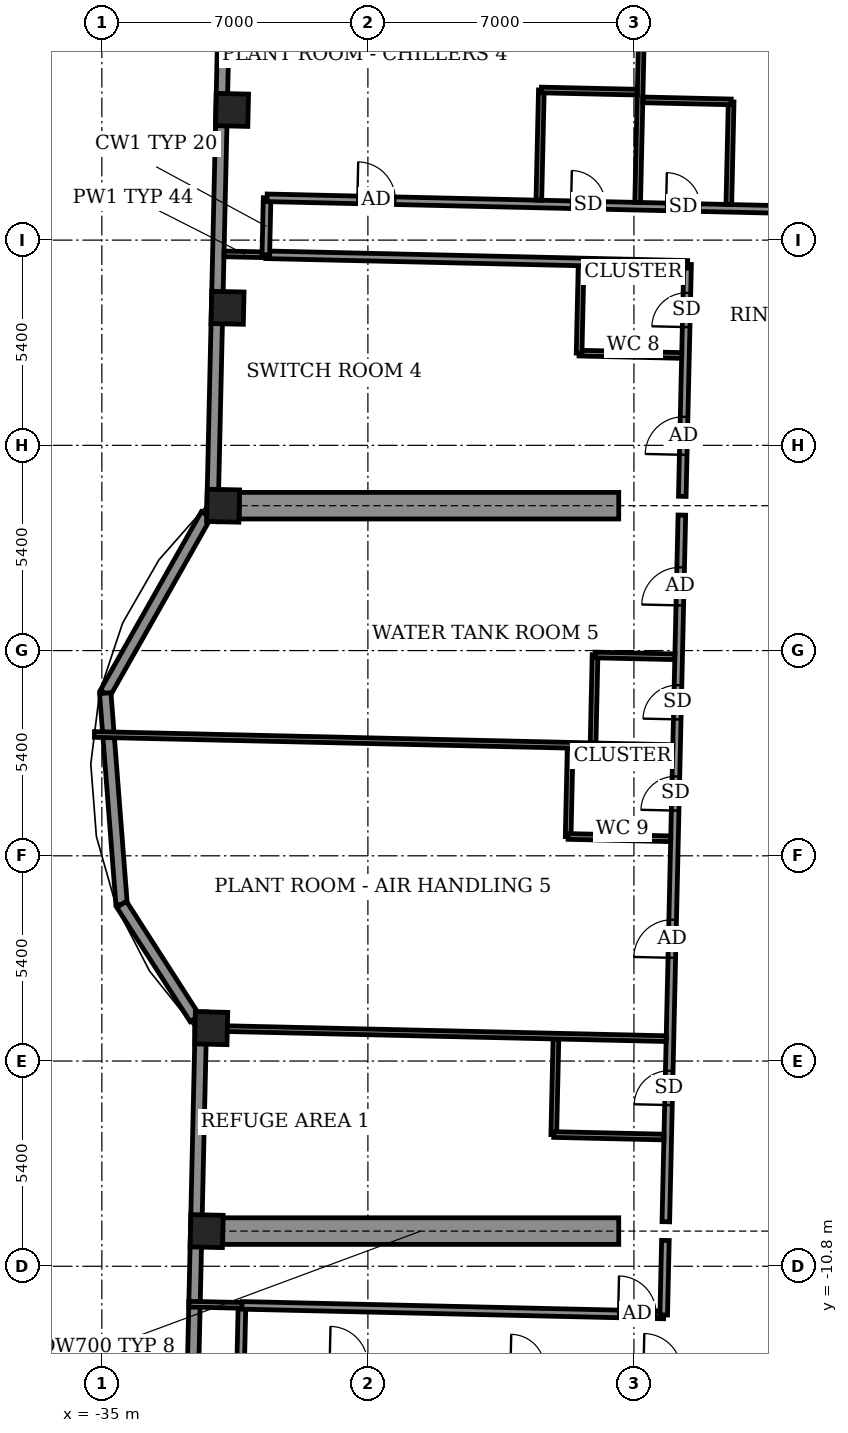
"""IFC4 building model, lengths in metres.
Left out: names, types, materials, properties, quantities, classifications, styles, units other than length and angle.
Written with IfcOpenShell. Run it as: python <this file> out.ifc"""

import sys

from ifc_helpers import new_model, si_unit, direction, frame, frame_2d, origin, origin_2d, place, context, subcontext, project, spatial, rectangle, extrude, element, fill, save


model = new_model("IFC4")
c1 = context("Model", 3, precision=1e-05, world=origin(), true_north=direction((0.0, 1.0)))
c2 = subcontext(c1, "Body", "Model", "MODEL_VIEW")
j1 = project(units=[si_unit("LENGTHUNIT", "METRE"), si_unit("PLANEANGLEUNIT", "RADIAN")], contexts=[c1])
p1 = place(None, origin())
s1 = spatial("IfcSite", under=j1, at=p1, CompositionType="ELEMENT")
p2 = place(p1, origin())
s2 = spatial("IfcBuilding", under=s1, at=p2, CompositionType="ELEMENT")
p3 = place(p2, frame((0.0, 0.0, 324.1)))
s3 = spatial("IfcBuildingStorey", under=s2, at=p3, CompositionType="ELEMENT", Elevation=324.1)
for number, where, z_axis, x_axis in (
    (1, (-32.123, -4.535, -0.55), (0.0, 0.0, 1.0), (-0.023, -1.0, 0.0)),
    (2, (-32.244, -9.875, -0.55), (0.0, 0.0, 1.0), (-0.023, -1.0, 0.0)),
    (3, (-31.575, 19.626, -0.55), (0.0, 0.0, 1.0), (-0.023, -1.0, 0.0)),
    (4, (-31.693, 14.419, -0.55), (0.0, 0.0, 1.0), (-0.023, -1.0, 0.0)),
    (5, (-31.811, 9.212, -0.55), (0.0, 0.0, 1.0), (-0.023, -1.0, 0.0)),
):
    element("IfcColumn", number, at=place(p3, frame(where, z_axis=z_axis, x_axis=x_axis)), inside=s3, PredefinedType="COLUMN", context=c2, shape_type="SweptSolid", body=[
        extrude(rectangle(XDim=0.85, YDim=0.85, at=origin_2d()), origin(), (0.0, 0.0, 1.0), 5.6),
    ])
p4 = place(p3, frame((-21.4, 9.212, 0.0), z_axis=(0.0, 0.0, 1.0), x_axis=(-1.0, 0.0, 0.0)))
e6 = element("IfcWall", 6, at=p4, inside=s3, PredefinedType="SHEAR", context=c2, shape_type="SweptSolid", body=[
    extrude(rectangle(XDim=9.986, YDim=0.7, at=frame_2d((4.993, 0.0))), origin(), (0.0, 0.0, 1.0), 3.0),
])
p5 = place(p3, frame((-21.4, -9.875, 0.0), z_axis=(0.0, 0.0, 1.0), x_axis=(-1.0, 0.0, 0.0)))
e7 = element("IfcWall", 7, at=p5, inside=s3, PredefinedType="SHEAR", context=c2, shape_type="SweptSolid", body=[
    extrude(rectangle(XDim=10.419, YDim=0.7, at=frame_2d((5.209, 0.0))), origin(), (0.0, 0.0, 1.0), 3.0),
])
p6 = place(p3, frame((-31.735, 24.69, 0.0), z_axis=(0.0, 0.0, 1.0), x_axis=(-0.022694199758, -0.999742453484, 0.0)))
e8 = element("IfcWall", 8, at=p6, inside=s3, PredefinedType="SOLIDWALL", context=c2, shape_type="SweptSolid", body=[
    extrude(rectangle(XDim=15.9, YDim=0.3, at=frame_2d((7.95, 0.0))), origin(), (0.0, 0.0, 1.0), 5.05),
])
p7 = place(p3, frame((-32.252, 8.978, 0.0), z_axis=(0.0, 0.0, 1.0), x_axis=(-0.492554919955, -0.870281363025, 0.0)))
e9 = element("IfcWall", 9, at=p7, inside=s3, PredefinedType="SOLIDWALL", context=c2, shape_type="SweptSolid", body=[
    extrude(rectangle(XDim=5.398, YDim=0.3, at=frame_2d((2.699, 0.0))), origin(), (0.0, 0.0, 1.0), 5.05),
])
p8 = place(p3, frame((-34.911, 4.28, 0.0), z_axis=(0.0, 0.0, 1.0), x_axis=(0.077135284219, -0.997020635658, 0.0)))
e10 = element("IfcWall", 10, at=p8, inside=s3, PredefinedType="SOLIDWALL", context=c2, shape_type="SweptSolid", body=[
    extrude(rectangle(XDim=5.574, YDim=0.3, at=frame_2d((2.787, 0.0))), origin(), (0.0, 0.0, 1.0), 5.05),
])
p9 = place(p3, frame((-34.481, -1.277, 0.0), z_axis=(0.0, 0.0, 1.0), x_axis=(0.540460234606, -0.841369558999, 0.0)))
e11 = element("IfcWall", 11, at=p9, inside=s3, PredefinedType="SOLIDWALL", context=c2, shape_type="SweptSolid", body=[
    extrude(rectangle(XDim=3.569, YDim=0.3, at=frame_2d((1.785, 0.0))), origin(), (0.0, 0.0, 1.0), 5.05),
])
p10 = place(p3, frame((-32.388, -4.104, 0.0), z_axis=(0.0, 0.0, 1.0), x_axis=(-0.02270779533, -0.999742144771, 0.0)))
e12 = element("IfcWall", 12, at=p10, inside=s3, PredefinedType="SOLIDWALL", context=c2, shape_type="SweptSolid", body=[
    extrude(rectangle(XDim=16.299, YDim=0.3, at=frame_2d((8.149, 0.0))), origin(), (0.0, 0.0, 1.0), 5.05),
])
p11 = place(p3, frame((-31.347, -13.329, 0.0), z_axis=(0.0, 0.0, 1.0), x_axis=(0.022617910375, 0.999744182344, 0.0)))
e13 = element("IfcWall", 13, at=p11, inside=s3, PredefinedType="PARTITIONING", context=c2, shape_type="SweptSolid", body=[
    extrude(rectangle(XDim=1.5, YDim=0.2, at=frame_2d((0.75, 0.0))), origin(), (0.0, 0.0, 1.0), 5.05),
])
p12 = place(p3, frame((-32.713, -11.798, 0.0), z_axis=(0.0, 0.0, 1.0), x_axis=(0.999756172383, -0.022081571112, 0.0)))
e14 = element("IfcWall", 14, at=p12, inside=s3, PredefinedType="PARTITIONING", context=c2, shape_type="SweptSolid", body=[
    extrude(rectangle(XDim=1.404, YDim=0.15, at=frame_2d((0.702, 0.0))), origin(), (0.0, 0.0, 1.0), 4.55),
])
p13 = place(p3, frame((-31.313, -11.829, 0.0), z_axis=(0.0, 0.0, 1.0), x_axis=(0.999742346277, -0.022698921993, 0.0)))
e15 = element("IfcWall", 15, at=p13, inside=s3, PredefinedType="PARTITIONING", context=c2, shape_type="SweptSolid", body=[
    extrude(rectangle(XDim=11.1, YDim=0.2, at=frame_2d((5.55, 0.0))), origin(), (0.0, 0.0, 1.0), 5.05),
])
p14 = place(p13, frame((9.9, 0.0, 0.0)))
e16 = element("IfcOpeningElement", 16, at=p14, cuts=e15, PredefinedType="OPENING", context=c2, shape_type="SweptSolid", body=[
    extrude(rectangle(XDim=1.0, YDim=2.1, at=frame_2d((0.5, 1.05))), frame((0.0, 0.11, 0.0), z_axis=(0.0, -1.0, 0.0), x_axis=(1.0, 0.0, 0.0)), (0.0, 0.0, 1.0), 0.22),
])
p15 = place(p3, frame((-20.216, -12.081, 0.0), z_axis=(0.0, 0.0, 1.0), x_axis=(0.02241589086, 0.999748732351, 0.0)))
e17 = element("IfcWall", 17, at=p15, inside=s3, PredefinedType="PARTITIONING", context=c2, shape_type="SweptSolid", body=[
    extrude(rectangle(XDim=1.96, YDim=0.2, at=frame_2d((0.98, 0.0))), origin(), (0.0, 0.0, 1.0), 3.0),
])
p16 = place(p3, frame((-20.161, -9.629, 0.0), z_axis=(0.0, 0.0, 1.0), x_axis=(0.022682940103, 0.999742709015, 0.0)))
e18 = element("IfcWall", 18, at=p16, inside=s3, PredefinedType="PARTITIONING", context=c2, shape_type="SweptSolid", body=[
    extrude(rectangle(XDim=18.599, YDim=0.2, at=frame_2d((9.299, 0.0))), origin(), (0.0, 0.0, 1.0), 3.0),
])
p17 = place(p16, frame((16.222, 0.0, 0.0)))
e19 = element("IfcOpeningElement", 19, at=p17, cuts=e18, PredefinedType="OPENING", context=c2, shape_type="SweptSolid", body=[
    extrude(rectangle(XDim=1.0, YDim=2.1, at=frame_2d((0.5, 1.05))), frame((0.0, 0.11, 0.0), z_axis=(0.0, -1.0, 0.0), x_axis=(1.0, 0.0, 0.0)), (0.0, 0.0, 1.0), 0.22),
])
p18 = place(p16, frame((13.222, 0.0, 0.0)))
e20 = element("IfcOpeningElement", 20, at=p18, cuts=e18, PredefinedType="OPENING", context=c2, shape_type="SweptSolid", body=[
    extrude(rectangle(XDim=0.9, YDim=2.1, at=frame_2d((0.45, 1.05))), frame((0.0, 0.11, 0.0), z_axis=(0.0, -1.0, 0.0), x_axis=(1.0, 0.0, 0.0)), (0.0, 0.0, 1.0), 0.22),
])
p19 = place(p16, frame((6.947, 0.0, 0.0)))
e21 = element("IfcOpeningElement", 21, at=p19, cuts=e18, PredefinedType="OPENING", context=c2, shape_type="SweptSolid", body=[
    extrude(rectangle(XDim=1.0, YDim=2.1, at=frame_2d((0.5, 1.05))), frame((0.0, 0.11, 0.0), z_axis=(0.0, -1.0, 0.0), x_axis=(1.0, 0.0, 0.0)), (0.0, 0.0, 1.0), 0.22),
])
p20 = place(p16, frame((10.822, 0.0, 0.0)))
e22 = element("IfcOpeningElement", 22, at=p20, cuts=e18, PredefinedType="OPENING", context=c2, shape_type="SweptSolid", body=[
    extrude(rectangle(XDim=0.9, YDim=2.1, at=frame_2d((0.45, 1.05))), frame((0.0, 0.11, 0.0), z_axis=(0.0, -1.0, 0.0), x_axis=(1.0, 0.0, 0.0)), (0.0, 0.0, 1.0), 0.22),
])
p21 = place(p16, frame((3.072, 0.0, 0.0)))
e23 = element("IfcOpeningElement", 23, at=p21, cuts=e18, PredefinedType="OPENING", context=c2, shape_type="SweptSolid", body=[
    extrude(rectangle(XDim=0.9, YDim=2.1, at=frame_2d((0.45, 1.05))), frame((0.0, 0.11, 0.0), z_axis=(0.0, -1.0, 0.0), x_axis=(1.0, 0.0, 0.0)), (0.0, 0.0, 1.0), 0.22),
])
p22 = place(p3, frame((-23.109, -7.339, 0.0), z_axis=(0.0, 0.0, 1.0), x_axis=(0.022530308093, 0.999746160391, 0.0)))
e24 = element("IfcWall", 24, at=p22, inside=s3, PredefinedType="PARTITIONING", context=c2, shape_type="SweptSolid", body=[
    extrude(rectangle(XDim=2.525, YDim=0.15, at=frame_2d((1.262, 0.0))), origin(), (0.0, 0.0, 1.0), 5.05),
])
p23 = place(p3, frame((-23.109, -7.334, 0.0), z_axis=(0.0, 0.0, 1.0), x_axis=(0.999741574676, -0.022732880677, 0.0)))
e25 = element("IfcWall", 25, at=p23, inside=s3, PredefinedType="PARTITIONING", context=c2, shape_type="SweptSolid", body=[
    extrude(rectangle(XDim=2.9, YDim=0.15, at=frame_2d((1.45, 0.0))), origin(), (0.0, 0.0, 1.0), 5.05),
])
p24 = place(p3, frame((-32.548, -4.529, 0.0), z_axis=(0.0, 0.0, 1.0), x_axis=(0.999741418644, -0.022739741597, 0.0)))
e26 = element("IfcWall", 26, at=p24, inside=s3, PredefinedType="PARTITIONING", context=c2, shape_type="SweptSolid", body=[
    extrude(rectangle(XDim=12.4, YDim=0.15, at=frame_2d((6.2, 0.0))), origin(), (0.0, 0.0, 1.0), 5.05),
])
p25 = place(p3, frame((-22.731, 0.504, 0.0), z_axis=(0.0, 0.0, 1.0), x_axis=(0.022358961731, 0.999750007167, 0.0)))
e27 = element("IfcWall", 27, at=p25, inside=s3, PredefinedType="PARTITIONING", context=c2, shape_type="SweptSolid", body=[
    extrude(rectangle(XDim=2.326, YDim=0.15, at=frame_2d((1.163, 0.0))), origin(), (0.0, 0.0, 1.0), 5.05),
])
p26 = place(p3, frame((-22.731, 0.509, 0.0), z_axis=(0.0, 0.0, 1.0), x_axis=(0.999744396973, -0.02260842146, 0.0)))
e28 = element("IfcWall", 28, at=p26, inside=s3, PredefinedType="PARTITIONING", context=c2, shape_type="SweptSolid", body=[
    extrude(rectangle(XDim=2.7, YDim=0.15, at=frame_2d((1.35, 0.0))), origin(), (0.0, 0.0, 1.0), 5.05),
])
p27 = place(p3, frame((-22.075, 2.965, 0.0), z_axis=(0.0, 0.0, 1.0), x_axis=(0.022370700241, 0.999749744571, 0.0)))
e29 = element("IfcWall", 29, at=p27, inside=s3, PredefinedType="PARTITIONING", context=c2, shape_type="SweptSolid", body=[
    extrude(rectangle(XDim=2.324, YDim=0.15, at=frame_2d((1.162, 0.0))), origin(), (0.0, 0.0, 1.0), 5.05),
])
p28 = place(p3, frame((-35.196, 3.193, 0.0), z_axis=(0.0, 0.0, 1.0), x_axis=(0.999741346783, -0.022742900707, 0.0)))
e30 = element("IfcWall", 30, at=p28, inside=s3, PredefinedType="PARTITIONING", context=c2, shape_type="SweptSolid", body=[
    extrude(rectangle(XDim=15.222, YDim=0.15, at=frame_2d((7.611, 0.0))), origin(), (0.0, 0.0, 1.0), 4.55),
])
p29 = place(p3, frame((-22.023, 5.284, 0.0), z_axis=(0.0, 0.0, 1.0), x_axis=(0.999750935236, -0.02231742583, 0.0)))
e31 = element("IfcWall", 31, at=p29, inside=s3, PredefinedType="PARTITIONING", context=c2, shape_type="SweptSolid", body=[
    extrude(rectangle(XDim=2.1, YDim=0.15, at=frame_2d((1.05, 0.0))), origin(), (0.0, 0.0, 1.0), 5.05),
])
p30 = place(p3, frame((-31.936, 9.22, 0.0), z_axis=(0.0, 0.0, 1.0), x_axis=(0.999752642043, -0.022240834685, 0.0)))
e32 = element("IfcWall", 32, at=p30, inside=s3, PredefinedType="PARTITIONING", context=c2, shape_type="SweptSolid", body=[
    extrude(rectangle(XDim=0.45, YDim=0.15, at=frame_2d((0.225, 0.0))), origin(), (0.0, 0.0, 1.0), 5.05),
])
p31 = place(p3, frame((-19.728, 9.458, 0.0), z_axis=(0.0, 0.0, 1.0), x_axis=(0.022752288008, 0.999741133189, 0.0)))
e33 = element("IfcWall", 33, at=p31, inside=s3, PredefinedType="PARTITIONING", context=c2, shape_type="SweptSolid", body=[
    extrude(rectangle(XDim=6.105, YDim=0.2, at=frame_2d((3.053, 0.0))), origin(), (0.0, 0.0, 1.0), 3.0),
])
p32 = place(p31, frame((1.093, 0.0, 0.0)))
e34 = element("IfcOpeningElement", 34, at=p32, cuts=e33, PredefinedType="OPENING", context=c2, shape_type="SweptSolid", body=[
    extrude(rectangle(XDim=1.0, YDim=2.1, at=frame_2d((0.5, 1.05))), frame((0.0, 0.11, 0.0), z_axis=(0.0, -1.0, 0.0), x_axis=(1.0, 0.0, 0.0)), (0.0, 0.0, 1.0), 0.22),
])
p33 = place(p31, frame((4.455, 0.0, 0.0)))
e35 = element("IfcOpeningElement", 35, at=p33, cuts=e33, PredefinedType="OPENING", context=c2, shape_type="SweptSolid", body=[
    extrude(rectangle(XDim=0.9, YDim=2.1, at=frame_2d((0.45, 1.05))), frame((0.0, 0.11, 0.0), z_axis=(0.0, -1.0, 0.0), x_axis=(1.0, 0.0, 0.0)), (0.0, 0.0, 1.0), 0.22),
])
p34 = place(p3, frame((-22.443, 13.226, 0.0), z_axis=(0.0, 0.0, 1.0), x_axis=(0.999744627938, -0.022598205876, 0.0)))
e36 = element("IfcWall", 36, at=p34, inside=s3, PredefinedType="PARTITIONING", context=c2, shape_type="SweptSolid", body=[
    extrude(rectangle(XDim=2.701, YDim=0.15, at=frame_2d((1.351, 0.0))), origin(), (0.0, 0.0, 1.0), 5.05),
])
p35 = place(p3, frame((-22.443, 13.226, 0.0), z_axis=(0.0, 0.0, 1.0), x_axis=(0.022615284993, 0.999744241736, 0.0)))
e37 = element("IfcWall", 37, at=p35, inside=s3, PredefinedType="PARTITIONING", context=c2, shape_type="SweptSolid", body=[
    extrude(rectangle(XDim=2.299, YDim=0.15, at=frame_2d((1.15, 0.0))), origin(), (0.0, 0.0, 1.0), 5.05),
])
p36 = place(p3, frame((-31.786, 15.838, 0.0), z_axis=(0.0, 0.0, 1.0), x_axis=(0.999745701647, -0.022550654924, 0.0)))
e38 = element("IfcWall", 38, at=p36, inside=s3, PredefinedType="PARTITIONING", context=c2, shape_type="SweptSolid", body=[
    extrude(rectangle(XDim=1.104, YDim=0.15, at=frame_2d((0.552, 0.0))), origin(), (0.0, 0.0, 1.0), 4.55),
])
p37 = place(p3, frame((-30.686, 15.814, 0.0), z_axis=(0.0, 0.0, 1.0), x_axis=(0.999742346277, -0.022698921993, 0.0)))
e39 = element("IfcWall", 39, at=p37, inside=s3, PredefinedType="PARTITIONING", context=c2, shape_type="SweptSolid", body=[
    extrude(rectangle(XDim=11.1, YDim=0.2, at=frame_2d((5.55, 0.0))), origin(), (0.0, 0.0, 1.0), 5.05),
])
p38 = place(p3, frame((-30.686, 15.814, 0.0), z_axis=(0.0, 0.0, 1.0), x_axis=(0.022632637625, 0.99974384905, 0.0)))
e40 = element("IfcWall", 40, at=p38, inside=s3, PredefinedType="PARTITIONING", context=c2, shape_type="SweptSolid", body=[
    extrude(rectangle(XDim=1.5, YDim=0.2, at=frame_2d((0.75, 0.0))), origin(), (0.0, 0.0, 1.0), 5.05),
])
p39 = place(p3, frame((-30.652, 17.313, 0.0), z_axis=(0.0, 0.0, 1.0), x_axis=(0.999742324741, -0.022699870507, 0.0)))
e41 = element("IfcWall", 41, at=p39, inside=s3, PredefinedType="PARTITIONING", context=c2, shape_type="SweptSolid", body=[
    extrude(rectangle(XDim=18.542, YDim=0.2, at=frame_2d((9.271, 0.0))), origin(), (0.0, 0.0, 1.0), 3.0),
])
p40 = place(p39, frame((14.275, 0.0, 0.0)))
e42 = element("IfcOpeningElement", 42, at=p40, cuts=e41, PredefinedType="OPENING", context=c2, shape_type="SweptSolid", body=[
    extrude(rectangle(XDim=1.0, YDim=2.1, at=frame_2d((0.5, 1.05))), frame((0.0, 0.11, 0.0), z_axis=(0.0, -1.0, 0.0), x_axis=(1.0, 0.0, 0.0)), (0.0, 0.0, 1.0), 0.22),
])
p41 = place(p39, frame((10.5, 0.0, 0.0)))
e43 = element("IfcOpeningElement", 43, at=p41, cuts=e41, PredefinedType="OPENING", context=c2, shape_type="SweptSolid", body=[
    extrude(rectangle(XDim=0.9, YDim=2.1, at=frame_2d((0.45, 1.05))), frame((0.0, 0.11, 0.0), z_axis=(0.0, -1.0, 0.0), x_axis=(1.0, 0.0, 0.0)), (0.0, 0.0, 1.0), 0.22),
])
p42 = place(p39, frame((2.375, 0.0, 0.0)))
e44 = element("IfcOpeningElement", 44, at=p42, cuts=e41, PredefinedType="OPENING", context=c2, shape_type="SweptSolid", body=[
    extrude(rectangle(XDim=1.0, YDim=2.1, at=frame_2d((0.5, 1.05))), frame((0.0, 0.11, 0.0), z_axis=(0.0, -1.0, 0.0), x_axis=(1.0, 0.0, 0.0)), (0.0, 0.0, 1.0), 0.22),
])
p43 = place(p39, frame((8.0, 0.0, 0.0)))
e45 = element("IfcOpeningElement", 45, at=p43, cuts=e41, PredefinedType="OPENING", context=c2, shape_type="SweptSolid", body=[
    extrude(rectangle(XDim=0.9, YDim=2.1, at=frame_2d((0.45, 1.05))), frame((0.0, 0.11, 0.0), z_axis=(0.0, -1.0, 0.0), x_axis=(1.0, 0.0, 0.0)), (0.0, 0.0, 1.0), 0.22),
])
p44 = place(p3, frame((-23.502, 17.251, 0.0), z_axis=(0.0, 0.0, 1.0), x_axis=(0.022732880677, 0.999741574676, 0.0)))
e46 = element("IfcWall", 46, at=p44, inside=s3, PredefinedType="PARTITIONING", context=c2, shape_type="SweptSolid", body=[
    extrude(rectangle(XDim=2.9, YDim=0.15, at=frame_2d((1.45, 0.0))), origin(), (0.0, 0.0, 1.0), 5.05),
])
p45 = place(p3, frame((-20.902, 17.192, 0.0), z_axis=(0.0, 0.0, 1.0), x_axis=(0.022658157282, 0.999743270999, 0.0)))
e47 = element("IfcWall", 47, at=p45, inside=s3, PredefinedType="PARTITIONING", context=c2, shape_type="SweptSolid", body=[
    extrude(rectangle(XDim=12.1, YDim=0.15, at=frame_2d((6.05, 0.0))), origin(), (0.0, 0.0, 1.0), 4.55),
])
p46 = place(p3, frame((-18.503, 17.137, 0.0), z_axis=(0.0, 0.0, 1.0), x_axis=(0.022600248254, 0.99974458177, 0.0)))
e48 = element("IfcWall", 48, at=p46, inside=s3, PredefinedType="PARTITIONING", context=c2, shape_type="SweptSolid", body=[
    extrude(rectangle(XDim=2.701, YDim=0.15, at=frame_2d((1.35, 0.0))), origin(), (0.0, 0.0, 1.0), 5.05),
])
p47 = place(p3, frame((-20.766, 19.89, 0.0), z_axis=(0.0, 0.0, 1.0), x_axis=(0.99974031529, -0.022788198363, 0.0)))
e49 = element("IfcWall", 49, at=p47, inside=s3, PredefinedType="PARTITIONING", context=c2, shape_type="SweptSolid", body=[
    extrude(rectangle(XDim=2.325, YDim=0.15, at=frame_2d((1.162, 0.0))), origin(), (0.0, 0.0, 1.0), 5.05),
])
p48 = place(p3, frame((-23.436, 20.15, 0.0), z_axis=(0.0, 0.0, 1.0), x_axis=(0.9997461113, -0.022532486354, 0.0)))
e50 = element("IfcWall", 50, at=p48, inside=s3, PredefinedType="PARTITIONING", context=c2, shape_type="SweptSolid", body=[
    extrude(rectangle(XDim=2.525, YDim=0.15, at=frame_2d((1.262, 0.0))), origin(), (0.0, 0.0, 1.0), 5.05),
])
p49 = place(p41, origin())
e51 = element("IfcDoor", 51, at=p49, inside=s3, OperationType="SINGLE_SWING_LEFT", PredefinedType="DOOR", context=c2, shape_type="SweptSolid", body=[
    extrude(rectangle(XDim=0.9, YDim=2.1, at=frame_2d((0.45, 1.05))), frame((0.0, 0.025, 0.0), z_axis=(0.0, -1.0, 0.0), x_axis=(1.0, 0.0, 0.0)), (0.0, 0.0, 1.0), 0.05),
])
fill(e43, e51)
p50 = place(p42, origin())
e52 = element("IfcDoor", 52, at=p50, inside=s3, OperationType="SINGLE_SWING_RIGHT", PredefinedType="DOOR", context=c2, shape_type="SweptSolid", body=[
    extrude(rectangle(XDim=1.0, YDim=2.1, at=frame_2d((0.5, 1.05))), frame((0.0, 0.025, 0.0), z_axis=(0.0, -1.0, 0.0), x_axis=(1.0, 0.0, 0.0)), (0.0, 0.0, 1.0), 0.05),
])
fill(e44, e52)
p51 = place(p43, origin())
e53 = element("IfcDoor", 53, at=p51, inside=s3, OperationType="SINGLE_SWING_RIGHT", PredefinedType="DOOR", context=c2, shape_type="SweptSolid", body=[
    extrude(rectangle(XDim=0.9, YDim=2.1, at=frame_2d((0.45, 1.05))), frame((0.0, 0.025, 0.0), z_axis=(0.0, -1.0, 0.0), x_axis=(1.0, 0.0, 0.0)), (0.0, 0.0, 1.0), 0.05),
])
fill(e45, e53)
p52 = place(p32, origin())
e54 = element("IfcDoor", 54, at=p52, inside=s3, OperationType="SINGLE_SWING_LEFT", PredefinedType="DOOR", context=c2, shape_type="SweptSolid", body=[
    extrude(rectangle(XDim=1.0, YDim=2.1, at=frame_2d((0.5, 1.05))), frame((0.0, 0.025, 0.0), z_axis=(0.0, -1.0, 0.0), x_axis=(1.0, 0.0, 0.0)), (0.0, 0.0, 1.0), 0.05),
])
fill(e34, e54)
p53 = place(p33, origin())
e55 = element("IfcDoor", 55, at=p53, inside=s3, OperationType="SINGLE_SWING_LEFT", PredefinedType="DOOR", context=c2, shape_type="SweptSolid", body=[
    extrude(rectangle(XDim=0.9, YDim=2.1, at=frame_2d((0.45, 1.05))), frame((0.0, 0.025, 0.0), z_axis=(0.0, -1.0, 0.0), x_axis=(1.0, 0.0, 0.0)), (0.0, 0.0, 1.0), 0.05),
])
fill(e35, e55)
p54 = place(p17, origin())
e56 = element("IfcDoor", 56, at=p54, inside=s3, OperationType="SINGLE_SWING_RIGHT", PredefinedType="DOOR", context=c2, shape_type="SweptSolid", body=[
    extrude(rectangle(XDim=1.0, YDim=2.1, at=frame_2d((0.5, 1.05))), frame((0.0, 0.025, 0.0), z_axis=(0.0, -1.0, 0.0), x_axis=(1.0, 0.0, 0.0)), (0.0, 0.0, 1.0), 0.05),
])
fill(e19, e56)
p55 = place(p18, origin())
e57 = element("IfcDoor", 57, at=p55, inside=s3, OperationType="SINGLE_SWING_RIGHT", PredefinedType="DOOR", context=c2, shape_type="SweptSolid", body=[
    extrude(rectangle(XDim=0.9, YDim=2.1, at=frame_2d((0.45, 1.05))), frame((0.0, 0.025, 0.0), z_axis=(0.0, -1.0, 0.0), x_axis=(1.0, 0.0, 0.0)), (0.0, 0.0, 1.0), 0.05),
])
fill(e20, e57)
p56 = place(p19, origin())
e58 = element("IfcDoor", 58, at=p56, inside=s3, OperationType="SINGLE_SWING_LEFT", PredefinedType="DOOR", context=c2, shape_type="SweptSolid", body=[
    extrude(rectangle(XDim=1.0, YDim=2.1, at=frame_2d((0.5, 1.05))), frame((0.0, 0.025, 0.0), z_axis=(0.0, -1.0, 0.0), x_axis=(1.0, 0.0, 0.0)), (0.0, 0.0, 1.0), 0.05),
])
fill(e21, e58)
p57 = place(p20, origin())
e59 = element("IfcDoor", 59, at=p57, inside=s3, OperationType="SINGLE_SWING_LEFT", PredefinedType="DOOR", context=c2, shape_type="SweptSolid", body=[
    extrude(rectangle(XDim=0.9, YDim=2.1, at=frame_2d((0.45, 1.05))), frame((0.0, 0.025, 0.0), z_axis=(0.0, -1.0, 0.0), x_axis=(1.0, 0.0, 0.0)), (0.0, 0.0, 1.0), 0.05),
])
fill(e22, e59)
p58 = place(p14, origin())
e60 = element("IfcDoor", 60, at=p58, inside=s3, OperationType="SINGLE_SWING_RIGHT", PredefinedType="DOOR", context=c2, shape_type="SweptSolid", body=[
    extrude(rectangle(XDim=1.0, YDim=2.1, at=frame_2d((0.5, 1.05))), frame((0.0, 0.025, 0.0), z_axis=(0.0, -1.0, 0.0), x_axis=(1.0, 0.0, 0.0)), (0.0, 0.0, 1.0), 0.05),
])
fill(e16, e60)
p59 = place(p21, origin())
e61 = element("IfcDoor", 61, at=p59, inside=s3, OperationType="SINGLE_SWING_RIGHT", PredefinedType="DOOR", context=c2, shape_type="SweptSolid", body=[
    extrude(rectangle(XDim=0.9, YDim=2.1, at=frame_2d((0.45, 1.05))), frame((0.0, 0.025, 0.0), z_axis=(0.0, -1.0, 0.0), x_axis=(1.0, 0.0, 0.0)), (0.0, 0.0, 1.0), 0.05),
])
fill(e23, e61)
save(model, sys.argv[1])
